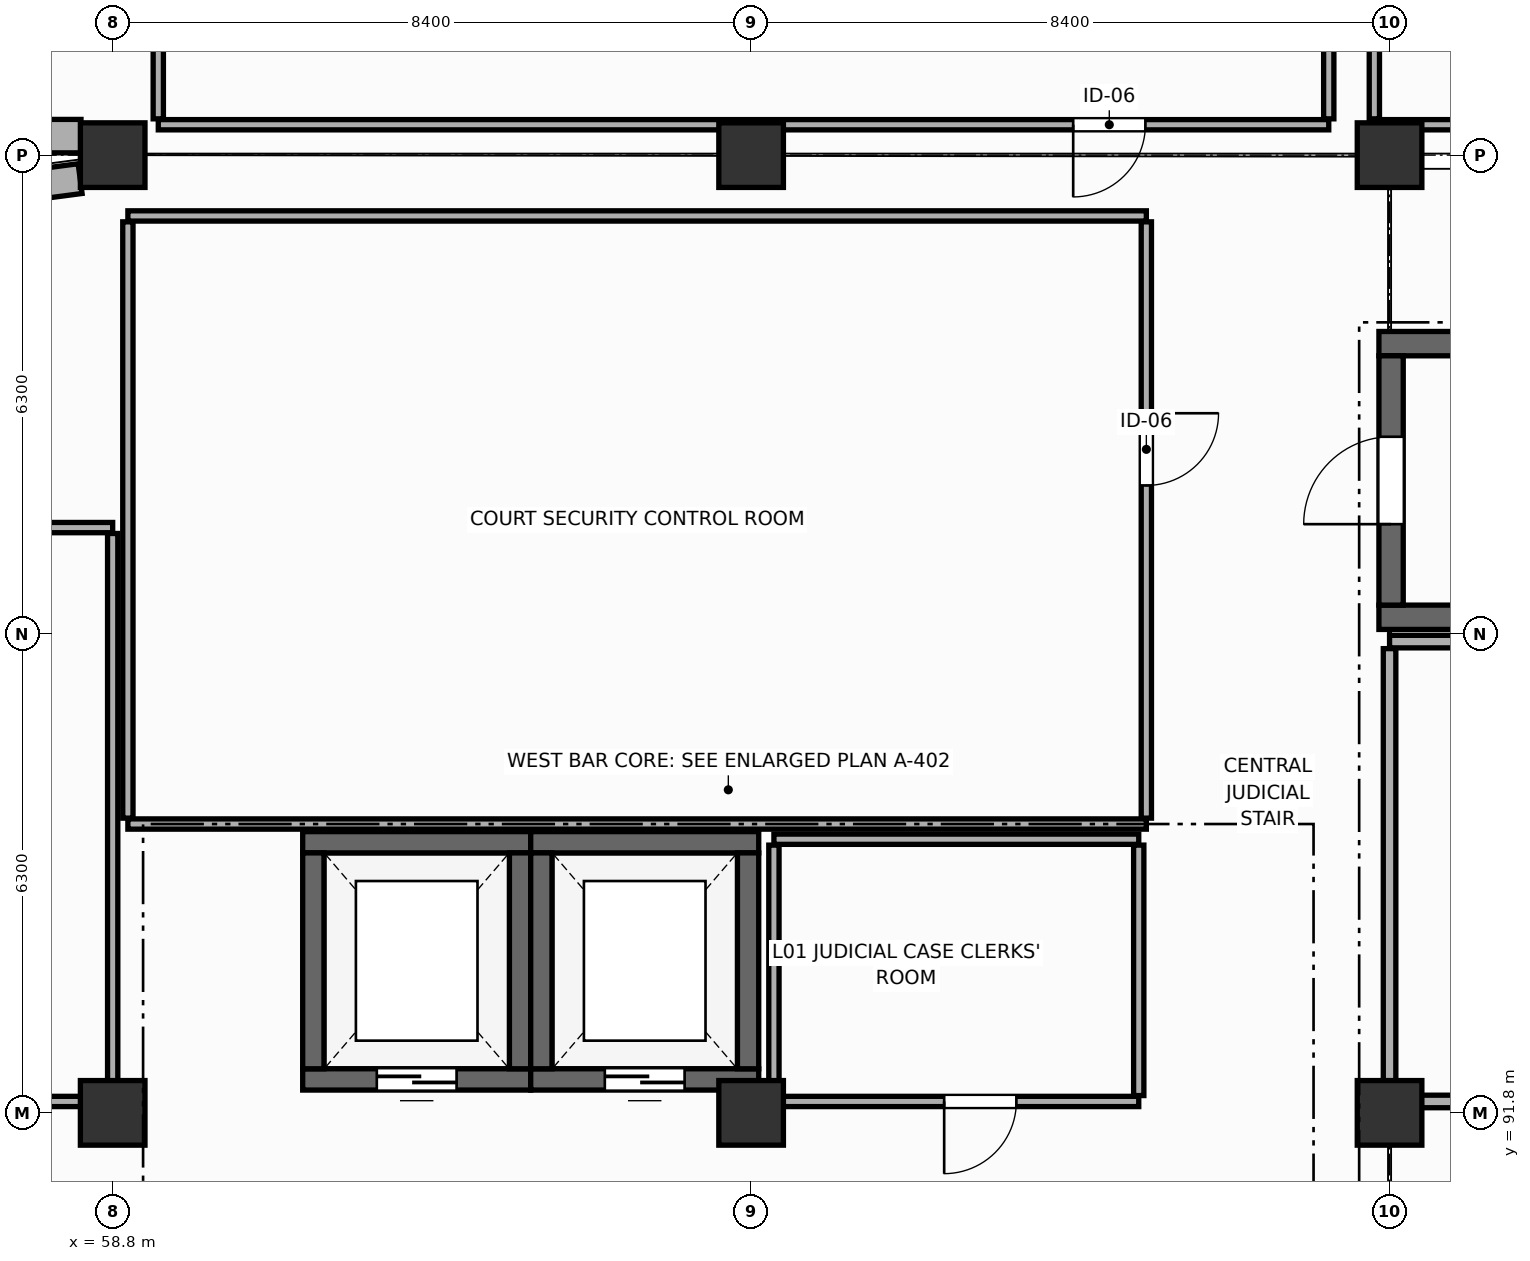
"""IFC4 building model, lengths in metres.
Left out: names, types, materials, properties, quantities, classifications, styles, units other than length and angle.
Written with IfcOpenShell. Run it as: python <this file> out.ifc"""

import sys

from ifc_helpers import new_model, si_unit, direction, frame, frame_2d, origin, origin_2d, place, context, subcontext, project, spatial, rectangle, extrude, element, fill, save


model = new_model("IFC4")
c1 = context("Model", 3, precision=1e-05, world=origin(), true_north=direction((0.0, 1.0)))
c2 = subcontext(c1, "Body", "Model", "MODEL_VIEW")
j1 = project(units=[si_unit("LENGTHUNIT", "METRE"), si_unit("PLANEANGLEUNIT", "RADIAN")], contexts=[c1])
p1 = place(None, origin())
s1 = spatial("IfcSite", under=j1, at=p1, CompositionType="ELEMENT")
p2 = place(p1, origin())
s2 = spatial("IfcBuilding", under=s1, at=p2, CompositionType="ELEMENT")
p3 = place(p2, origin())
s3 = spatial("IfcBuildingStorey", under=s2, at=p3, CompositionType="ELEMENT", Elevation=0.0)
for number, where, z_axis, x_axis in (
    (1, (58.8, 91.8, 0.0), (0.0, 0.0, 1.0), (1.0, 0.0, 0.0)),
    (2, (58.8, 104.4, 0.0), (0.0, 0.0, 1.0), (1.0, 0.0, 0.0)),
    (3, (67.2, 91.8, 0.0), (0.0, 0.0, 1.0), (1.0, 0.0, 0.0)),
    (4, (67.2, 104.4, 0.0), (0.0, 0.0, 1.0), (1.0, 0.0, 0.0)),
    (5, (75.6, 91.8, 0.0), (0.0, 0.0, 1.0), (1.0, 0.0, 0.0)),
    (6, (75.6, 104.4, 0.0), (0.0, 0.0, 1.0), (1.0, 0.0, 0.0)),
):
    element("IfcColumn", number, at=place(p3, frame(where, z_axis=z_axis, x_axis=x_axis)), inside=s3, PredefinedType="COLUMN", context=c2, shape_type="SweptSolid", body=[
        extrude(rectangle(XDim=0.85, YDim=0.85, at=origin_2d()), origin(), (0.0, 0.0, 1.0), 5.4),
    ])
p4 = place(p3, frame((58.383, 104.65, 0.0), z_axis=(0.0, 0.0, 1.0), x_axis=(-1.0, 0.0, 0.0)))
e7 = element("IfcWall", 7, at=p4, inside=s3, PredefinedType="STANDARD", context=c2, shape_type="SweptSolid", body=[
    extrude(rectangle(XDim=11.683, YDim=0.44, at=frame_2d((5.842, 0.0))), origin(), (0.0, 0.0, 1.0), 4.22),
])
p5 = place(p4, frame((2.658, 0.0, 0.9)))
e8 = element("IfcOpeningElement", 8, at=p5, cuts=e7, PredefinedType="OPENING", context=c2, shape_type="SweptSolid", body=[
    extrude(rectangle(XDim=1.2, YDim=1.85, at=frame_2d((0.6, 0.925))), frame((0.0, 0.23, 0.0), z_axis=(0.0, -1.0, 0.0), x_axis=(1.0, 0.0, 0.0)), (0.0, 0.0, 1.0), 0.46),
])
p6 = place(p4, frame((7.908, 0.0, 0.9)))
e9 = element("IfcOpeningElement", 9, at=p6, cuts=e7, PredefinedType="OPENING", context=c2, shape_type="SweptSolid", body=[
    extrude(rectangle(XDim=1.2, YDim=1.85, at=frame_2d((0.6, 0.925))), frame((0.0, 0.23, 0.0), z_axis=(0.0, -1.0, 0.0), x_axis=(1.0, 0.0, 0.0)), (0.0, 0.0, 1.0), 0.46),
])
p7 = place(p3, frame((58.372, 104.091, 0.0), z_axis=(0.0, 0.0, 1.0), x_axis=(-0.991455178228, -0.130447803989, 0.0)))
e10 = element("IfcWall", 10, at=p7, inside=s3, PredefinedType="ELEMENTEDWALL", context=c2, shape_type="SweptSolid", body=[
    extrude(rectangle(XDim=2.824, YDim=0.395, at=frame_2d((1.412, 0.0))), origin(), (0.0, 0.0, 1.0), 4.27),
])
p8 = place(p7, frame((0.962, 0.0, 0.85)))
e11 = element("IfcOpeningElement", 11, at=p8, cuts=e10, PredefinedType="OPENING", context=c2, shape_type="SweptSolid", body=[
    extrude(rectangle(XDim=0.9, YDim=1.85, at=frame_2d((0.45, 0.925))), frame((0.0, 0.208, 0.0), z_axis=(0.0, -1.0, 0.0), x_axis=(1.0, 0.0, 0.0)), (0.0, 0.0, 1.0), 0.415),
])
for number, where, z_axis, x_axis in (
    (12, (75.46, 101.92, 0.0), (0.0, 0.0, 1.0), (1.0, 0.0, 0.0)),
    (13, (84.54, 98.32, 0.0), (0.0, 0.0, 1.0), (-1.0, 0.0, 0.0)),
):
    element("IfcWall", number, at=place(p3, frame(where, z_axis=z_axis, x_axis=x_axis)), inside=s3, PredefinedType="SHEAR", context=c2, shape_type="SweptSolid", body=[
        extrude(rectangle(XDim=9.08, YDim=0.32, at=frame_2d((4.54, 0.0))), origin(), (0.0, 0.0, 1.0), 5.14),
    ])
p9 = place(p3, frame((75.62, 98.48, 0.0), z_axis=(0.0, 0.0, 1.0), x_axis=(0.0, 1.0, 0.0)))
e14 = element("IfcWall", 14, at=p9, inside=s3, PredefinedType="SHEAR", context=c2, shape_type="SweptSolid", body=[
    extrude(rectangle(XDim=3.28, YDim=0.32, at=frame_2d((1.64, 0.0))), origin(), (0.0, 0.0, 1.0), 5.14),
])
p10 = place(p9, frame((1.065, 0.0, 0.0)))
e15 = element("IfcOpeningElement", 15, at=p10, cuts=e14, PredefinedType="OPENING", context=c2, shape_type="SweptSolid", body=[
    extrude(rectangle(XDim=1.15, YDim=2.2, at=frame_2d((0.575, 1.1))), frame((0.0, 0.17, 0.0), z_axis=(0.0, -1.0, 0.0), x_axis=(1.0, 0.0, 0.0)), (0.0, 0.0, 1.0), 0.34),
])
p11 = place(p3, frame((61.3, 95.36, 0.0), z_axis=(0.0, 0.0, 1.0), x_axis=(1.0, 0.0, 0.0)))
e16 = element("IfcWall", 16, at=p11, inside=s3, PredefinedType="SHEAR", context=c2, shape_type="SweptSolid", body=[
    extrude(rectangle(XDim=3.0, YDim=0.28, at=frame_2d((1.5, 0.0))), origin(), (0.0, 0.0, 1.0), 5.14),
])
p12 = place(p3, frame((64.3, 92.24, 0.0), z_axis=(0.0, 0.0, 1.0), x_axis=(-1.0, 0.0, 0.0)))
e17 = element("IfcWall", 17, at=p12, inside=s3, PredefinedType="SHEAR", context=c2, shape_type="SweptSolid", body=[
    extrude(rectangle(XDim=3.0, YDim=0.28, at=frame_2d((1.5, 0.0))), origin(), (0.0, 0.0, 1.0), 5.14),
])
p13 = place(p12, frame((0.975, 0.0, 0.0)))
e18 = element("IfcOpeningElement", 18, at=p13, cuts=e17, PredefinedType="OPENING", context=c2, shape_type="SweptSolid", body=[
    extrude(rectangle(XDim=1.05, YDim=2.2, at=frame_2d((0.525, 1.1))), frame((0.0, 0.15, 0.0), z_axis=(0.0, -1.0, 0.0), x_axis=(1.0, 0.0, 0.0)), (0.0, 0.0, 1.0), 0.3),
])
for number, where, z_axis, x_axis in (
    (19, (61.44, 92.38, 0.0), (0.0, 0.0, 1.0), (0.0, 1.0, 0.0)),
    (20, (64.16, 95.22, 0.0), (0.0, 0.0, 1.0), (0.0, -1.0, 0.0)),
):
    element("IfcWall", number, at=place(p3, frame(where, z_axis=z_axis, x_axis=x_axis)), inside=s3, PredefinedType="SHEAR", context=c2, shape_type="SweptSolid", body=[
        extrude(rectangle(XDim=2.84, YDim=0.28, at=frame_2d((1.42, 0.0))), origin(), (0.0, 0.0, 1.0), 5.14),
    ])
p14 = place(p3, frame((64.3, 95.36, 0.0), z_axis=(0.0, 0.0, 1.0), x_axis=(1.0, 0.0, 0.0)))
e21 = element("IfcWall", 21, at=p14, inside=s3, PredefinedType="SHEAR", context=c2, shape_type="SweptSolid", body=[
    extrude(rectangle(XDim=3.0, YDim=0.28, at=frame_2d((1.5, 0.0))), origin(), (0.0, 0.0, 1.0), 5.14),
])
p15 = place(p3, frame((67.3, 92.24, 0.0), z_axis=(0.0, 0.0, 1.0), x_axis=(-1.0, 0.0, 0.0)))
e22 = element("IfcWall", 22, at=p15, inside=s3, PredefinedType="SHEAR", context=c2, shape_type="SweptSolid", body=[
    extrude(rectangle(XDim=3.0, YDim=0.28, at=frame_2d((1.5, 0.0))), origin(), (0.0, 0.0, 1.0), 5.14),
])
p16 = place(p15, frame((0.975, 0.0, 0.0)))
e23 = element("IfcOpeningElement", 23, at=p16, cuts=e22, PredefinedType="OPENING", context=c2, shape_type="SweptSolid", body=[
    extrude(rectangle(XDim=1.05, YDim=2.2, at=frame_2d((0.525, 1.1))), frame((0.0, 0.15, 0.0), z_axis=(0.0, -1.0, 0.0), x_axis=(1.0, 0.0, 0.0)), (0.0, 0.0, 1.0), 0.3),
])
for number, where, z_axis, x_axis in (
    (24, (64.44, 92.38, 0.0), (0.0, 0.0, 1.0), (0.0, 1.0, 0.0)),
    (25, (67.16, 95.22, 0.0), (0.0, 0.0, 1.0), (0.0, -1.0, 0.0)),
):
    element("IfcWall", number, at=place(p3, frame(where, z_axis=z_axis, x_axis=x_axis)), inside=s3, PredefinedType="SHEAR", context=c2, shape_type="SweptSolid", body=[
        extrude(rectangle(XDim=2.84, YDim=0.28, at=frame_2d((1.42, 0.0))), origin(), (0.0, 0.0, 1.0), 5.14),
    ])
p17 = place(p3, frame((74.8, 104.8, 0.0), z_axis=(0.0, 0.0, 1.0), x_axis=(-1.0, 0.0, 0.0)))
e26 = element("IfcWall", 26, at=p17, inside=s3, PredefinedType="PARTITIONING", context=c2, shape_type="SweptSolid", body=[
    extrude(rectangle(XDim=15.4, YDim=0.135, at=frame_2d((7.7, 0.0))), origin(), (0.0, 0.0, 1.0), 4.27),
])
p18 = place(p17, frame((2.413, 0.0, 0.0)))
e27 = element("IfcOpeningElement", 27, at=p18, cuts=e26, PredefinedType="OPENING", context=c2, shape_type="SweptSolid", body=[
    extrude(rectangle(XDim=0.95, YDim=2.15, at=frame_2d((0.475, 1.075))), frame((0.0, 0.077, 0.0), z_axis=(0.0, -1.0, 0.0), x_axis=(1.0, 0.0, 0.0)), (0.0, 0.0, 1.0), 0.155),
])
p19 = place(p3, frame((59.4, 104.877, 0.0), z_axis=(0.0, 0.0, 1.0), x_axis=(0.0, 1.0, 0.0)))
e28 = element("IfcWall", 28, at=p19, inside=s3, PredefinedType="PARTITIONING", context=c2, shape_type="SweptSolid", body=[
    extrude(rectangle(XDim=7.458, YDim=0.135, at=frame_2d((3.729, 0.0))), origin(), (0.0, 0.0, 1.0), 4.79),
])
p20 = place(p3, frame((74.8, 112.49, 0.0), z_axis=(0.0, 0.0, 1.0), x_axis=(0.0, -1.0, 0.0)))
e29 = element("IfcWall", 29, at=p20, inside=s3, PredefinedType="PARTITIONING", context=c2, shape_type="SweptSolid", body=[
    extrude(rectangle(XDim=7.613, YDim=0.135, at=frame_2d((3.806, 0.0))), origin(), (0.0, 0.0, 1.0), 4.67),
])
p21 = place(p3, frame((101.566, 104.8, 0.0), z_axis=(0.0, 0.0, 1.0), x_axis=(-1.0, 0.0, 0.0)))
e30 = element("IfcWall", 30, at=p21, inside=s3, PredefinedType="PARTITIONING", context=c2, shape_type="SweptSolid", body=[
    extrude(rectangle(XDim=26.166, YDim=0.135, at=frame_2d((13.083, 0.0))), origin(), (0.0, 0.0, 1.0), 4.27),
])
p22 = place(p21, frame((21.189, 0.0, 0.0)))
e31 = element("IfcOpeningElement", 31, at=p22, cuts=e30, PredefinedType="OPENING", context=c2, shape_type="SweptSolid", body=[
    extrude(rectangle(XDim=0.95, YDim=2.15, at=frame_2d((0.475, 1.075))), frame((0.0, 0.077, 0.0), z_axis=(0.0, -1.0, 0.0), x_axis=(1.0, 0.0, 0.0)), (0.0, 0.0, 1.0), 0.155),
])
p23 = place(p3, frame((75.4, 104.877, 0.0), z_axis=(0.0, 0.0, 1.0), x_axis=(0.0, 1.0, 0.0)))
e32 = element("IfcWall", 32, at=p23, inside=s3, PredefinedType="PARTITIONING", context=c2, shape_type="SweptSolid", body=[
    extrude(rectangle(XDim=7.245, YDim=0.135, at=frame_2d((3.623, 0.0))), origin(), (0.0, 0.0, 1.0), 4.27),
])
for number, where, z_axis, x_axis in (
    (33, (59.0, 103.6, 0.0), (0.0, 0.0, 1.0), (1.0, 0.0, 0.0)),
    (34, (72.4, 95.6, 0.0), (0.0, 0.0, 1.0), (-1.0, 0.0, 0.0)),
):
    element("IfcWall", number, at=place(p3, frame(where, z_axis=z_axis, x_axis=x_axis)), inside=s3, PredefinedType="PARTITIONING", context=c2, shape_type="SweptSolid", body=[
        extrude(rectangle(XDim=13.4, YDim=0.135, at=frame_2d((6.7, 0.0))), origin(), (0.0, 0.0, 1.0), 4.27),
    ])
p24 = place(p3, frame((59.0, 95.677, 0.0), z_axis=(0.0, 0.0, 1.0), x_axis=(0.0, 1.0, 0.0)))
e35 = element("IfcWall", 35, at=p24, inside=s3, PredefinedType="PARTITIONING", context=c2, shape_type="SweptSolid", body=[
    extrude(rectangle(XDim=7.845, YDim=0.135, at=frame_2d((3.922, 0.0))), origin(), (0.0, 0.0, 1.0), 4.27),
])
p25 = place(p3, frame((72.4, 103.522, 0.0), z_axis=(0.0, 0.0, 1.0), x_axis=(0.0, -1.0, 0.0)))
e36 = element("IfcWall", 36, at=p25, inside=s3, PredefinedType="PARTITIONING", context=c2, shape_type="SweptSolid", body=[
    extrude(rectangle(XDim=7.845, YDim=0.135, at=frame_2d((3.922, 0.0))), origin(), (0.0, 0.0, 1.0), 4.52),
])
p26 = place(p25, frame((2.518, 0.0, 0.0)))
e37 = element("IfcOpeningElement", 37, at=p26, cuts=e36, PredefinedType="OPENING", context=c2, shape_type="SweptSolid", body=[
    extrude(rectangle(XDim=0.95, YDim=2.15, at=frame_2d((0.475, 1.075))), frame((0.0, 0.077, 0.0), z_axis=(0.0, -1.0, 0.0), x_axis=(1.0, 0.0, 0.0)), (0.0, 0.0, 1.0), 0.155),
])
p27 = place(p3, frame((67.5, 95.4, 0.0), z_axis=(0.0, 0.0, 1.0), x_axis=(1.0, 0.0, 0.0)))
e38 = element("IfcWall", 38, at=p27, inside=s3, PredefinedType="PARTITIONING", context=c2, shape_type="SweptSolid", body=[
    extrude(rectangle(XDim=4.8, YDim=0.135, at=frame_2d((2.4, 0.0))), origin(), (0.0, 0.0, 1.0), 4.27),
])
p28 = place(p3, frame((72.3, 91.95, 0.0), z_axis=(0.0, 0.0, 1.0), x_axis=(-1.0, 0.0, 0.0)))
e39 = element("IfcWall", 39, at=p28, inside=s3, PredefinedType="PARTITIONING", context=c2, shape_type="SweptSolid", body=[
    extrude(rectangle(XDim=4.8, YDim=0.135, at=frame_2d((2.4, 0.0))), origin(), (0.0, 0.0, 1.0), 4.27),
])
p29 = place(p28, frame((1.61, 0.0, 0.0)))
e40 = element("IfcOpeningElement", 40, at=p29, cuts=e39, PredefinedType="OPENING", context=c2, shape_type="SweptSolid", body=[
    extrude(rectangle(XDim=0.95, YDim=2.15, at=frame_2d((0.475, 1.075))), frame((0.0, 0.077, 0.0), z_axis=(0.0, -1.0, 0.0), x_axis=(1.0, 0.0, 0.0)), (0.0, 0.0, 1.0), 0.155),
])
p30 = place(p3, frame((67.5, 92.028, 0.0), z_axis=(0.0, 0.0, 1.0), x_axis=(0.0, 1.0, 0.0)))
e41 = element("IfcWall", 41, at=p30, inside=s3, PredefinedType="PARTITIONING", context=c2, shape_type="SweptSolid", body=[
    extrude(rectangle(XDim=3.295, YDim=0.135, at=frame_2d((1.647, 0.0))), origin(), (0.0, 0.0, 1.0), 4.27),
])
p31 = place(p3, frame((72.3, 95.323, 0.0), z_axis=(0.0, 0.0, 1.0), x_axis=(0.0, -1.0, 0.0)))
e42 = element("IfcWall", 42, at=p31, inside=s3, PredefinedType="PARTITIONING", context=c2, shape_type="SweptSolid", body=[
    extrude(rectangle(XDim=3.295, YDim=0.135, at=frame_2d((1.647, 0.0))), origin(), (0.0, 0.0, 1.0), 4.47),
])
p32 = place(p3, frame((75.6, 98.0, 0.0), z_axis=(0.0, 0.0, 1.0), x_axis=(1.0, 0.0, 0.0)))
e43 = element("IfcWall", 43, at=p32, inside=s3, PredefinedType="PARTITIONING", context=c2, shape_type="SweptSolid", body=[
    extrude(rectangle(XDim=8.8, YDim=0.165, at=frame_2d((4.4, 0.0))), origin(), (0.0, 0.0, 1.0), 4.27),
])
p33 = place(p3, frame((84.4, 91.95, 0.0), z_axis=(0.0, 0.0, 1.0), x_axis=(-1.0, 0.0, 0.0)))
e44 = element("IfcWall", 44, at=p33, inside=s3, PredefinedType="PARTITIONING", context=c2, shape_type="SweptSolid", body=[
    extrude(rectangle(XDim=8.8, YDim=0.165, at=frame_2d((4.4, 0.0))), origin(), (0.0, 0.0, 1.0), 4.27),
])
p34 = place(p33, frame((4.61, 0.0, 0.0)))
e45 = element("IfcOpeningElement", 45, at=p34, cuts=e44, PredefinedType="OPENING", context=c2, shape_type="SweptSolid", body=[
    extrude(rectangle(XDim=1.0, YDim=2.15, at=frame_2d((0.5, 1.075))), frame((0.0, 0.093, 0.0), z_axis=(0.0, -1.0, 0.0), x_axis=(1.0, 0.0, 0.0)), (0.0, 0.0, 1.0), 0.185),
])
p35 = place(p3, frame((75.6, 92.042, 0.0), z_axis=(0.0, 0.0, 1.0), x_axis=(0.0, 1.0, 0.0)))
e46 = element("IfcWall", 46, at=p35, inside=s3, PredefinedType="PARTITIONING", context=c2, shape_type="SweptSolid", body=[
    extrude(rectangle(XDim=5.865, YDim=0.165, at=frame_2d((2.933, 0.0))), origin(), (0.0, 0.0, 1.0), 4.27),
])
p36 = place(p3, frame((49.3, 99.5, 0.0), z_axis=(0.0, 0.0, 1.0), x_axis=(1.0, 0.0, 0.0)))
e47 = element("IfcWall", 47, at=p36, inside=s3, PredefinedType="PARTITIONING", context=c2, shape_type="SweptSolid", body=[
    extrude(rectangle(XDim=9.5, YDim=0.135, at=frame_2d((4.75, 0.0))), origin(), (0.0, 0.0, 1.0), 4.17),
])
p37 = place(p3, frame((58.8, 91.95, 0.0), z_axis=(0.0, 0.0, 1.0), x_axis=(-1.0, 0.0, 0.0)))
e48 = element("IfcWall", 48, at=p37, inside=s3, PredefinedType="PARTITIONING", context=c2, shape_type="SweptSolid", body=[
    extrude(rectangle(XDim=9.5, YDim=0.135, at=frame_2d((4.75, 0.0))), origin(), (0.0, 0.0, 1.0), 4.17),
])
p38 = place(p37, frame((3.073, 0.0, 0.0)))
e49 = element("IfcOpeningElement", 49, at=p38, cuts=e48, PredefinedType="OPENING", context=c2, shape_type="SweptSolid", body=[
    extrude(rectangle(XDim=1.02, YDim=2.15, at=frame_2d((0.51, 1.075))), frame((0.0, 0.077, 0.0), z_axis=(0.0, -1.0, 0.0), x_axis=(1.0, 0.0, 0.0)), (0.0, 0.0, 1.0), 0.155),
])
p39 = place(p3, frame((58.8, 99.423, 0.0), z_axis=(0.0, 0.0, 1.0), x_axis=(0.0, -1.0, 0.0)))
e50 = element("IfcWall", 50, at=p39, inside=s3, PredefinedType="PARTITIONING", context=c2, shape_type="SweptSolid", body=[
    extrude(rectangle(XDim=7.395, YDim=0.135, at=frame_2d((3.698, 0.0))), origin(), (0.0, 0.0, 1.0), 4.27),
])
p40 = place(p10, origin())
e51 = element("IfcDoor", 51, at=p40, inside=s3, OperationType="SINGLE_SWING_LEFT", PredefinedType="DOOR", context=c2, shape_type="SweptSolid", body=[
    extrude(rectangle(XDim=1.15, YDim=2.2, at=frame_2d((0.575, 1.1))), frame((0.0, 0.025, 0.0), z_axis=(0.0, -1.0, 0.0), x_axis=(1.0, 0.0, 0.0)), (0.0, 0.0, 1.0), 0.05),
])
fill(e15, e51)
p41 = place(p13, origin())
e52 = element("IfcDoor", 52, at=p41, inside=s3, OperationType="DOUBLE_DOOR_SLIDING", PredefinedType="DOOR", context=c2, shape_type="SweptSolid", body=[
    extrude(rectangle(XDim=1.05, YDim=2.2, at=frame_2d((0.525, 1.1))), frame((0.0, 0.025, 0.0), z_axis=(0.0, -1.0, 0.0), x_axis=(1.0, 0.0, 0.0)), (0.0, 0.0, 1.0), 0.05),
])
fill(e18, e52)
p42 = place(p16, origin())
e53 = element("IfcDoor", 53, at=p42, inside=s3, OperationType="DOUBLE_DOOR_SLIDING", PredefinedType="DOOR", context=c2, shape_type="SweptSolid", body=[
    extrude(rectangle(XDim=1.05, YDim=2.2, at=frame_2d((0.525, 1.1))), frame((0.0, 0.025, 0.0), z_axis=(0.0, -1.0, 0.0), x_axis=(1.0, 0.0, 0.0)), (0.0, 0.0, 1.0), 0.05),
])
fill(e23, e53)
p43 = place(p18, origin())
e54 = element("IfcDoor", 54, at=p43, inside=s3, OperationType="SINGLE_SWING_RIGHT", PredefinedType="DOOR", context=c2, shape_type="SweptSolid", body=[
    extrude(rectangle(XDim=0.95, YDim=2.15, at=frame_2d((0.475, 1.075))), frame((0.0, 0.025, 0.0), z_axis=(0.0, -1.0, 0.0), x_axis=(1.0, 0.0, 0.0)), (0.0, 0.0, 1.0), 0.05),
])
fill(e27, e54)
p44 = place(p26, origin())
e55 = element("IfcDoor", 55, at=p44, inside=s3, OperationType="SINGLE_SWING_LEFT", PredefinedType="DOOR", context=c2, shape_type="SweptSolid", body=[
    extrude(rectangle(XDim=0.95, YDim=2.15, at=frame_2d((0.475, 1.075))), frame((0.0, 0.025, 0.0), z_axis=(0.0, -1.0, 0.0), x_axis=(1.0, 0.0, 0.0)), (0.0, 0.0, 1.0), 0.05),
])
fill(e37, e55)
p45 = place(p29, origin())
e56 = element("IfcDoor", 56, at=p45, inside=s3, OperationType="SINGLE_SWING_RIGHT", PredefinedType="DOOR", context=c2, shape_type="SweptSolid", body=[
    extrude(rectangle(XDim=0.95, YDim=2.15, at=frame_2d((0.475, 1.075))), frame((0.0, 0.025, 0.0), z_axis=(0.0, -1.0, 0.0), x_axis=(1.0, 0.0, 0.0)), (0.0, 0.0, 1.0), 0.05),
])
fill(e40, e56)
save(model, sys.argv[1])
